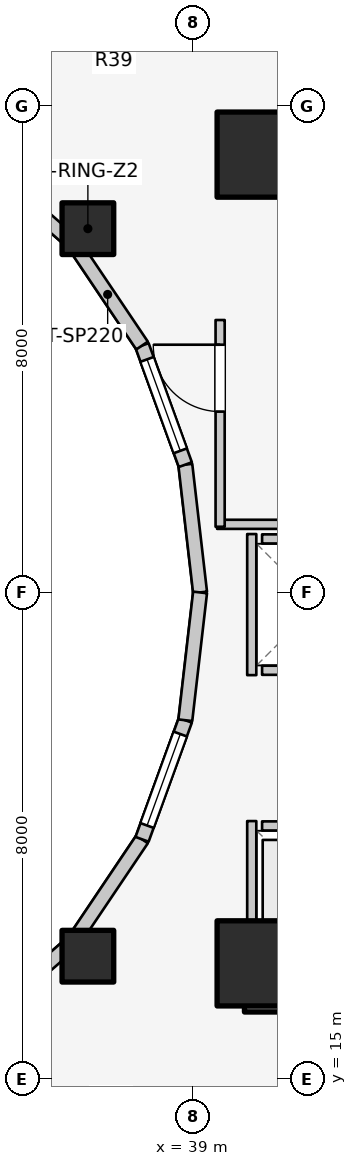
"""IFC4 building model, lengths in metres.
Left out: names, types, materials, properties, quantities, classifications, styles, units other than length and angle.
Written with IfcOpenShell. Run it as: python <this file> out.ifc"""

import sys

from ifc_helpers import new_model, si_unit, direction, frame, frame_2d, origin, origin_2d, place, context, subcontext, project, spatial, rectangle, extrude, element, fill, save


model = new_model("IFC4")
c1 = context("Model", 3, precision=1e-05, world=origin(), true_north=direction((0.0, 1.0)))
c2 = subcontext(c1, "Body", "Model", "MODEL_VIEW")
j1 = project(units=[si_unit("LENGTHUNIT", "METRE"), si_unit("PLANEANGLEUNIT", "RADIAN")], contexts=[c1])
p1 = place(None, origin())
s1 = spatial("IfcSite", under=j1, at=p1, CompositionType="ELEMENT")
p2 = place(p1, origin())
s2 = spatial("IfcBuilding", under=s1, at=p2, CompositionType="ELEMENT")
p3 = place(p2, frame((0.0, 0.0, 76.3)))
s3 = spatial("IfcBuildingStorey", under=s2, at=p3, CompositionType="ELEMENT", Elevation=76.3)
for number, where, z_axis, x_axis in (
    (1, (39.85, 16.55, 0.0), (0.0, 0.0, 1.0), (1.0, 0.0, 0.0)),
    (2, (39.85, 30.35, 0.0), (0.0, 0.0, 1.0), (1.0, 0.0, 0.0)),
):
    element("IfcWall", number, at=place(p3, frame(where, z_axis=z_axis, x_axis=x_axis)), inside=s3, PredefinedType="SHEAR", context=c2, shape_type="SweptSolid", body=[
        extrude(rectangle(XDim=4.5, YDim=0.9, at=frame_2d((2.25, 0.0))), origin(), (0.0, 0.0, 1.0), 3.1),
    ])
for number, where, z_axis, x_axis in (
    (3, (40.1, 16.9, 0.0), (0.0, 0.0, 1.0), (1.0, 0.0, 0.0)),
    (4, (40.1, 30.2, 0.0), (0.0, 0.0, 1.0), (1.0, 0.0, 0.0)),
):
    element("IfcColumn", number, at=place(p3, frame(where, z_axis=z_axis, x_axis=x_axis)), inside=s3, PredefinedType="COLUMN", context=c2, shape_type="SweptSolid", body=[
        extrude(rectangle(XDim=1.4, YDim=1.4, at=origin_2d()), origin(), (0.0, 0.0, 1.0), 3.1),
    ])
for number, where, z_axis, x_axis in (
    (5, (37.275, 28.982, 0.0), (0.0, 0.0, 1.0), (1.0, 0.0, 0.0)),
    (6, (37.275, 17.018, 0.0), (0.0, 0.0, 1.0), (1.0, 0.0, 0.0)),
):
    element("IfcColumn", number, at=place(p3, frame(where, z_axis=z_axis, x_axis=x_axis)), inside=s3, PredefinedType="COLUMN", context=c2, shape_type="SweptSolid", body=[
        extrude(rectangle(XDim=0.85, YDim=0.85, at=origin_2d()), origin(), (0.0, 0.0, 1.0), 3.1),
    ])
p4 = place(p3, frame((39.12, 23.0, 0.0), z_axis=(0.0, 0.0, 1.0), x_axis=(-0.114711713601, 0.993398823617, 0.0)))
e7 = element("IfcWall", 7, at=p4, inside=s3, PredefinedType="STANDARD", context=c2, shape_type="SweptSolid", body=[
    extrude(rectangle(XDim=2.115, YDim=0.23, at=frame_2d((1.058, 0.0))), origin(), (0.0, 0.0, 1.0), 2.84),
])
p5 = place(p3, frame((38.877, 25.102, 0.0), z_axis=(0.0, 0.0, 1.0), x_axis=(-0.341423187295, 0.93990968033, 0.0)))
e8 = element("IfcWall", 8, at=p5, inside=s3, PredefinedType="STANDARD", context=c2, shape_type="SweptSolid", body=[
    extrude(rectangle(XDim=2.084, YDim=0.23, at=frame_2d((1.042, 0.0))), origin(), (0.0, 0.0, 1.0), 2.84),
])
p6 = place(p5, frame((0.242, 0.0, 0.85)))
e9 = element("IfcOpeningElement", 9, at=p6, cuts=e8, PredefinedType="OPENING", context=c2, shape_type="SweptSolid", body=[
    extrude(rectangle(XDim=1.6, YDim=1.65, at=frame_2d((0.8, 0.825))), frame((0.0, 0.125, 0.0), z_axis=(0.0, -1.0, 0.0), x_axis=(1.0, 0.0, 0.0)), (0.0, 0.0, 1.0), 0.25),
])
p7 = place(p3, frame((38.166, 27.06, 0.0), z_axis=(0.0, 0.0, 1.0), x_axis=(-0.558197800898, 0.829707909492, 0.0)))
e10 = element("IfcWall", 10, at=p7, inside=s3, PredefinedType="STANDARD", context=c2, shape_type="SweptSolid", body=[
    extrude(rectangle(XDim=2.027, YDim=0.23, at=frame_2d((1.013, 0.0))), origin(), (0.0, 0.0, 1.0), 2.16),
])
for number, where, z_axis, x_axis in (
    (11, (37.035, 28.742, 0.0), (0.0, 0.0, 1.0), (-0.753, 0.659, 0.0)),
    (12, (35.56, 15.968, 0.0), (0.0, 0.0, 1.0), (0.753, 0.659, 0.0)),
):
    element("IfcWall", number, at=place(p3, frame(where, z_axis=z_axis, x_axis=x_axis)), inside=s3, PredefinedType="STANDARD", context=c2, shape_type="SweptSolid", body=[
        extrude(rectangle(XDim=1.959, YDim=0.23, at=frame_2d((0.98, 0.0))), origin(), (0.0, 0.0, 1.0), 2.16),
    ])
p8 = place(p3, frame((37.035, 17.258, 0.0), z_axis=(0.0, 0.0, 1.0), x_axis=(0.558197800898, 0.829707909492, 0.0)))
e13 = element("IfcWall", 13, at=p8, inside=s3, PredefinedType="STANDARD", context=c2, shape_type="SweptSolid", body=[
    extrude(rectangle(XDim=2.027, YDim=0.23, at=frame_2d((1.013, 0.0))), origin(), (0.0, 0.0, 1.0), 2.16),
])
p9 = place(p3, frame((38.166, 18.94, 0.0), z_axis=(0.0, 0.0, 1.0), x_axis=(0.341423187295, 0.93990968033, 0.0)))
e14 = element("IfcWall", 14, at=p9, inside=s3, PredefinedType="STANDARD", context=c2, shape_type="SweptSolid", body=[
    extrude(rectangle(XDim=2.084, YDim=0.23, at=frame_2d((1.042, 0.0))), origin(), (0.0, 0.0, 1.0), 2.84),
])
p10 = place(p9, frame((0.242, 0.0, 0.85)))
e15 = element("IfcOpeningElement", 15, at=p10, cuts=e14, PredefinedType="OPENING", context=c2, shape_type="SweptSolid", body=[
    extrude(rectangle(XDim=1.6, YDim=1.65, at=frame_2d((0.8, 0.825))), frame((0.0, 0.125, 0.0), z_axis=(0.0, -1.0, 0.0), x_axis=(1.0, 0.0, 0.0)), (0.0, 0.0, 1.0), 0.25),
])
p11 = place(p3, frame((38.877, 20.898, 0.0), z_axis=(0.0, 0.0, 1.0), x_axis=(0.114711713601, 0.993398823617, 0.0)))
e16 = element("IfcWall", 16, at=p11, inside=s3, PredefinedType="STANDARD", context=c2, shape_type="SweptSolid", body=[
    extrude(rectangle(XDim=2.115, YDim=0.23, at=frame_2d((1.058, 0.0))), origin(), (0.0, 0.0, 1.0), 2.84),
])
p12 = place(p3, frame((40.14, 19.16, 0.0), z_axis=(0.0, 0.0, 1.0), x_axis=(1.0, 0.0, 0.0)))
e17 = element("IfcWall", 17, at=p12, inside=s3, PredefinedType="SOLIDWALL", context=c2, shape_type="SweptSolid", body=[
    extrude(rectangle(XDim=1.82, YDim=0.15, at=frame_2d((0.91, 0.0))), origin(), (0.0, 0.0, 1.0), 2.12),
])
p13 = place(p12, frame((0.36, 0.0, 0.0)))
e18 = element("IfcOpeningElement", 18, at=p13, cuts=e17, PredefinedType="OPENING", context=c2, shape_type="SweptSolid", body=[
    extrude(rectangle(XDim=1.1, YDim=2.1, at=frame_2d((0.55, 1.05))), frame((0.0, 0.085, 0.0), z_axis=(0.0, -1.0, 0.0), x_axis=(1.0, 0.0, 0.0)), (0.0, 0.0, 1.0), 0.17),
])
p14 = place(p3, frame((40.14, 17.1, 0.0), z_axis=(0.0, 0.0, 1.0), x_axis=(1.0, 0.0, 0.0)))
e19 = element("IfcWall", 19, at=p14, inside=s3, PredefinedType="SOLIDWALL", context=c2, shape_type="SweptSolid", body=[
    extrude(rectangle(XDim=1.82, YDim=0.15, at=frame_2d((0.91, 0.0))), origin(), (0.0, 0.0, 1.0), 2.12),
])
p15 = place(p3, frame((39.97, 17.02, 0.0), z_axis=(0.0, 0.0, 1.0), x_axis=(0.0, 1.0, 0.0)))
e20 = element("IfcWall", 20, at=p15, inside=s3, PredefinedType="SOLIDWALL", context=c2, shape_type="SweptSolid", body=[
    extrude(rectangle(XDim=2.22, YDim=0.15, at=frame_2d((1.11, 0.0))), origin(), (0.0, 0.0, 1.0), 2.12),
])
for number, where, z_axis, x_axis in (
    (21, (40.14, 21.72, 0.0), (0.0, 0.0, 1.0), (1.0, 0.0, 0.0)),
    (22, (40.14, 23.88, 0.0), (0.0, 0.0, 1.0), (1.0, 0.0, 0.0)),
):
    element("IfcWall", number, at=place(p3, frame(where, z_axis=z_axis, x_axis=x_axis)), inside=s3, PredefinedType="SOLIDWALL", context=c2, shape_type="SweptSolid", body=[
        extrude(rectangle(XDim=1.82, YDim=0.15, at=frame_2d((0.91, 0.0))), origin(), (0.0, 0.0, 1.0), 2.12),
    ])
p16 = place(p3, frame((39.97, 21.64, 0.0), z_axis=(0.0, 0.0, 1.0), x_axis=(0.0, 1.0, 0.0)))
e23 = element("IfcWall", 23, at=p16, inside=s3, PredefinedType="SOLIDWALL", context=c2, shape_type="SweptSolid", body=[
    extrude(rectangle(XDim=2.32, YDim=0.15, at=frame_2d((1.16, 0.0))), origin(), (0.0, 0.0, 1.0), 2.12),
])
p17 = place(p3, frame((39.4, 24.12, 0.0), z_axis=(0.0, 0.0, 1.0), x_axis=(1.0, 0.0, 0.0)))
e24 = element("IfcWall", 24, at=p17, inside=s3, PredefinedType="PARTITIONING", context=c2, shape_type="SweptSolid", body=[
    extrude(rectangle(XDim=5.08, YDim=0.15, at=frame_2d((2.54, 0.0))), origin(), (0.0, 0.0, 1.0), 2.12),
])
p18 = place(p3, frame((39.45, 24.08, 0.0), z_axis=(0.0, 0.0, 1.0), x_axis=(0.0, 1.0, 0.0)))
e25 = element("IfcWall", 25, at=p18, inside=s3, PredefinedType="PARTITIONING", context=c2, shape_type="SweptSolid", body=[
    extrude(rectangle(XDim=3.4, YDim=0.15, at=frame_2d((1.7, 0.0))), origin(), (0.0, 0.0, 1.0), 2.855),
])
p19 = place(p18, frame((1.894, 0.0, 0.0)))
e26 = element("IfcOpeningElement", 26, at=p19, cuts=e25, PredefinedType="OPENING", context=c2, shape_type="SweptSolid", body=[
    extrude(rectangle(XDim=1.1, YDim=2.1, at=frame_2d((0.55, 1.05))), frame((0.0, 0.085, 0.0), z_axis=(0.0, -1.0, 0.0), x_axis=(1.0, 0.0, 0.0)), (0.0, 0.0, 1.0), 0.17),
])
p20 = place(p6, origin())
e27 = element("IfcWindow", 27, at=p20, inside=s3, PartitioningType="SINGLE_PANEL", PredefinedType="WINDOW", context=c2, shape_type="SweptSolid", body=[
    extrude(rectangle(XDim=1.6, YDim=1.65, at=frame_2d((0.8, 0.825))), frame((0.0, 0.03, 0.0), z_axis=(0.0, -1.0, 0.0), x_axis=(1.0, 0.0, 0.0)), (0.0, 0.0, 1.0), 0.06),
])
fill(e9, e27)
p21 = place(p10, origin())
e28 = element("IfcWindow", 28, at=p21, inside=s3, PartitioningType="SINGLE_PANEL", PredefinedType="WINDOW", context=c2, shape_type="SweptSolid", body=[
    extrude(rectangle(XDim=1.6, YDim=1.65, at=frame_2d((0.8, 0.825))), frame((0.0, 0.03, 0.0), z_axis=(0.0, -1.0, 0.0), x_axis=(1.0, 0.0, 0.0)), (0.0, 0.0, 1.0), 0.06),
])
fill(e15, e28)
p22 = place(p19, origin())
e29 = element("IfcDoor", 29, at=p22, inside=s3, OperationType="SINGLE_SWING_RIGHT", PredefinedType="DOOR", context=c2, shape_type="SweptSolid", body=[
    extrude(rectangle(XDim=1.1, YDim=2.1, at=frame_2d((0.55, 1.05))), frame((0.0, 0.025, 0.0), z_axis=(0.0, -1.0, 0.0), x_axis=(1.0, 0.0, 0.0)), (0.0, 0.0, 1.0), 0.05),
])
fill(e26, e29)
save(model, sys.argv[1])
